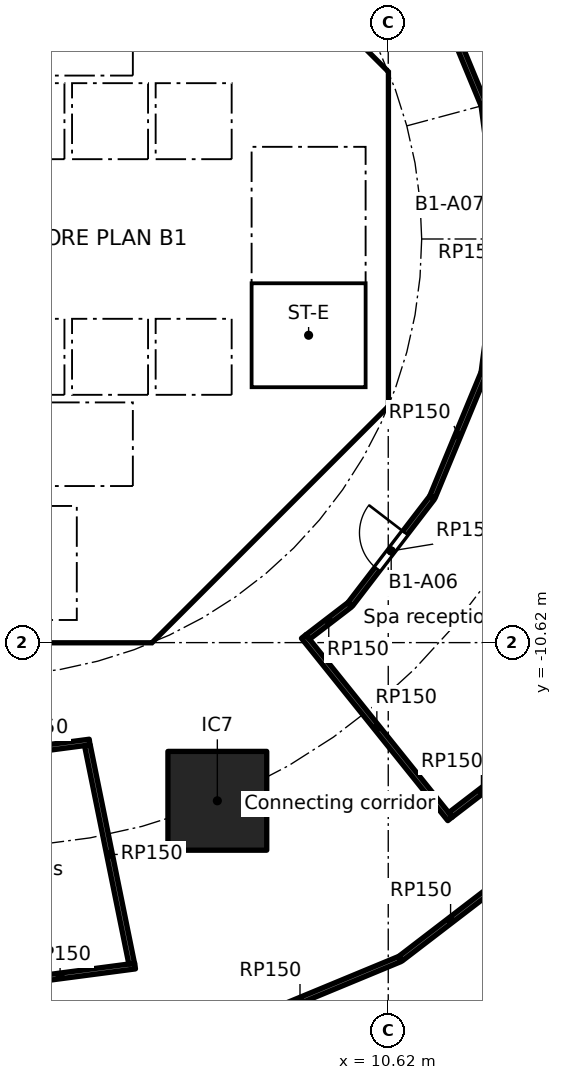
"""IFC4 building model, lengths in metres.
Left out: names, types, materials, properties, quantities, classifications, styles, units other than length and angle.
Written with IfcOpenShell. Run it as: python <this file> out.ifc"""

import sys

from ifc_helpers import new_model, si_unit, direction, frame, frame_2d, origin, origin_2d, place, context, subcontext, project, spatial, polyline, rectangle, outline, extrude, element, fill, save


model = new_model("IFC4")
c1 = context("Model", 3, precision=1e-05, world=origin(), true_north=direction((0.0, 1.0)))
c2 = subcontext(c1, "Body", "Model", "MODEL_VIEW")
j1 = project(units=[si_unit("LENGTHUNIT", "METRE"), si_unit("PLANEANGLEUNIT", "RADIAN")], contexts=[c1])
p1 = place(None, origin())
s1 = spatial("IfcSite", under=j1, at=p1, CompositionType="ELEMENT")
p2 = place(p1, origin())
s2 = spatial("IfcBuilding", under=s1, at=p2, CompositionType="ELEMENT")
p3 = place(p2, frame((0.0, 0.0, -5.0)))
s3 = spatial("IfcBuildingStorey", under=s2, at=p3, CompositionType="ELEMENT", Elevation=-5.0)
p4 = place(p3, frame((6.123, -14.782, 0.0), z_axis=(0.0, 0.0, 1.0), x_axis=(1.0, 0.0, 0.0)))
e1 = element("IfcColumn", 1, at=p4, inside=s3, PredefinedType="COLUMN", context=c2, shape_type="SweptSolid", body=[
    extrude(rectangle(XDim=2.6, YDim=2.6, at=origin_2d()), origin(), (0.0, 0.0, 1.0), 5.0),
])
p5 = place(p3, frame((9.988, 4.613, 0.0), z_axis=(0.0, 0.0, 1.0), x_axis=(-0.707106781187, 0.707106781187, 0.0)))
e2 = element("IfcWall", 2, at=p5, inside=s3, PredefinedType="SHEAR", context=c2, shape_type="SweptSolid", body=[
    extrude(rectangle(XDim=7.602, YDim=0.6, at=frame_2d((3.801, 0.0))), origin(), (0.0, 0.0, 1.0), 4.6),
])
p6 = place(p5, frame((3.201, 0.0, 0.0)))
e3 = element("IfcOpeningElement", 3, at=p6, cuts=e2, PredefinedType="OPENING", context=c2, shape_type="SweptSolid", body=[
    extrude(rectangle(XDim=1.2, YDim=2.1, at=frame_2d((0.6, 1.05))), frame((0.0, 0.31, 0.0), z_axis=(0.0, -1.0, 0.0), x_axis=(1.0, 0.0, 0.0)), (0.0, 0.0, 1.0), 0.62),
])
p7 = place(p3, frame((4.613, -9.988, 0.0), z_axis=(0.0, 0.0, 1.0), x_axis=(0.707106781187, 0.707106781187, 0.0)))
e4 = element("IfcWall", 4, at=p7, inside=s3, PredefinedType="SHEAR", context=c2, shape_type="SweptSolid", body=[
    extrude(rectangle(XDim=7.602, YDim=0.6, at=frame_2d((3.801, 0.0))), origin(), (0.0, 0.0, 1.0), 4.6),
])
p8 = place(p7, frame((3.201, 0.0, 0.0)))
e5 = element("IfcOpeningElement", 5, at=p8, cuts=e4, PredefinedType="OPENING", context=c2, shape_type="SweptSolid", body=[
    extrude(rectangle(XDim=1.2, YDim=2.1, at=frame_2d((0.6, 1.05))), frame((0.0, 0.31, 0.0), z_axis=(0.0, -1.0, 0.0), x_axis=(1.0, 0.0, 0.0)), (0.0, 0.0, 1.0), 0.62),
])
p9 = place(p3, frame((4.0, 4.3, 0.0), z_axis=(0.0, 0.0, 1.0), x_axis=(0.0, 1.0, 0.0)))
e6 = element("IfcWall", 6, at=p9, inside=s3, PredefinedType="SOLIDWALL", context=c2, shape_type="SweptSolid", body=[
    extrude(rectangle(XDim=2.2, YDim=0.2, at=frame_2d((1.1, 0.0))), origin(), (0.0, 0.0, 1.0), 4.6),
])
p10 = place(p9, frame((0.55, 0.0, 0.0)))
e7 = element("IfcOpeningElement", 7, at=p10, cuts=e6, PredefinedType="OPENING", context=c2, shape_type="SweptSolid", body=[
    extrude(rectangle(XDim=1.1, YDim=2.1, at=frame_2d((0.55, 1.05))), frame((0.0, 0.11, 0.0), z_axis=(0.0, -1.0, 0.0), x_axis=(1.0, 0.0, 0.0)), (0.0, 0.0, 1.0), 0.22),
])
p11 = place(p3, frame((-6.7, 2.0, 0.0), z_axis=(0.0, 0.0, 1.0), x_axis=(1.0, 0.0, 0.0)))
e8 = element("IfcWall", 8, at=p11, inside=s3, PredefinedType="SOLIDWALL", context=c2, shape_type="SweptSolid", body=[
    extrude(rectangle(XDim=13.4, YDim=0.2, at=frame_2d((6.7, 0.0))), origin(), (0.0, 0.0, 1.0), 4.6),
])
p12 = place(p11, frame((0.65, 0.0, 0.0)))
e9 = element("IfcOpeningElement", 9, at=p12, cuts=e8, PredefinedType="OPENING", context=c2, shape_type="SweptSolid", body=[
    extrude(rectangle(XDim=1.1, YDim=2.1, at=frame_2d((0.55, 1.05))), frame((0.0, 0.11, 0.0), z_axis=(0.0, -1.0, 0.0), x_axis=(1.0, 0.0, 0.0)), (0.0, 0.0, 1.0), 0.22),
])
p13 = place(p11, frame((2.85, 0.0, 0.0)))
e10 = element("IfcOpeningElement", 10, at=p13, cuts=e8, PredefinedType="OPENING", context=c2, shape_type="SweptSolid", body=[
    extrude(rectangle(XDim=1.1, YDim=2.1, at=frame_2d((0.55, 1.05))), frame((0.0, 0.11, 0.0), z_axis=(0.0, -1.0, 0.0), x_axis=(1.0, 0.0, 0.0)), (0.0, 0.0, 1.0), 0.22),
])
p14 = place(p11, frame((5.05, 0.0, 0.0)))
e11 = element("IfcOpeningElement", 11, at=p14, cuts=e8, PredefinedType="OPENING", context=c2, shape_type="SweptSolid", body=[
    extrude(rectangle(XDim=1.1, YDim=2.1, at=frame_2d((0.55, 1.05))), frame((0.0, 0.11, 0.0), z_axis=(0.0, -1.0, 0.0), x_axis=(1.0, 0.0, 0.0)), (0.0, 0.0, 1.0), 0.22),
])
p15 = place(p11, frame((7.25, 0.0, 0.0)))
e12 = element("IfcOpeningElement", 12, at=p15, cuts=e8, PredefinedType="OPENING", context=c2, shape_type="SweptSolid", body=[
    extrude(rectangle(XDim=1.1, YDim=2.1, at=frame_2d((0.55, 1.05))), frame((0.0, 0.11, 0.0), z_axis=(0.0, -1.0, 0.0), x_axis=(1.0, 0.0, 0.0)), (0.0, 0.0, 1.0), 0.22),
])
p16 = place(p11, frame((9.45, 0.0, 0.0)))
e13 = element("IfcOpeningElement", 13, at=p16, cuts=e8, PredefinedType="OPENING", context=c2, shape_type="SweptSolid", body=[
    extrude(rectangle(XDim=1.1, YDim=2.1, at=frame_2d((0.55, 1.05))), frame((0.0, 0.11, 0.0), z_axis=(0.0, -1.0, 0.0), x_axis=(1.0, 0.0, 0.0)), (0.0, 0.0, 1.0), 0.22),
])
p17 = place(p11, frame((11.65, 0.0, 0.0)))
e14 = element("IfcOpeningElement", 14, at=p17, cuts=e8, PredefinedType="OPENING", context=c2, shape_type="SweptSolid", body=[
    extrude(rectangle(XDim=1.1, YDim=2.1, at=frame_2d((0.55, 1.05))), frame((0.0, 0.11, 0.0), z_axis=(0.0, -1.0, 0.0), x_axis=(1.0, 0.0, 0.0)), (0.0, 0.0, 1.0), 0.22),
])
p18 = place(p3, frame((6.7, 4.0, 0.0), z_axis=(0.0, 0.0, 1.0), x_axis=(1.0, 0.0, 0.0)))
e15 = element("IfcWall", 15, at=p18, inside=s3, PredefinedType="SOLIDWALL", context=c2, shape_type="SweptSolid", body=[
    extrude(rectangle(XDim=3.325, YDim=0.2, at=frame_2d((1.662, 0.0))), origin(), (0.0, 0.0, 1.0), 4.6),
])
p19 = place(p18, frame((1.25, 0.0, 0.0)))
e16 = element("IfcOpeningElement", 16, at=p19, cuts=e15, PredefinedType="OPENING", context=c2, shape_type="SweptSolid", body=[
    extrude(rectangle(XDim=1.1, YDim=2.1, at=frame_2d((0.55, 1.05))), frame((0.0, 0.11, 0.0), z_axis=(0.0, -1.0, 0.0), x_axis=(1.0, 0.0, 0.0)), (0.0, 0.0, 1.0), 0.22),
])
p20 = place(p3, frame((4.0, -10.025, 0.0), z_axis=(0.0, 0.0, 1.0), x_axis=(0.0, 1.0, 0.0)))
e17 = element("IfcWall", 17, at=p20, inside=s3, PredefinedType="SOLIDWALL", context=c2, shape_type="SweptSolid", body=[
    extrude(rectangle(XDim=3.0, YDim=0.2, at=frame_2d((1.5, 0.0))), origin(), (0.0, 0.0, 1.0), 4.6),
])
p21 = place(p20, frame((0.975, 0.0, 0.0)))
e18 = element("IfcOpeningElement", 18, at=p21, cuts=e17, PredefinedType="OPENING", context=c2, shape_type="SweptSolid", body=[
    extrude(rectangle(XDim=1.1, YDim=2.1, at=frame_2d((0.55, 1.05))), frame((0.0, 0.11, 0.0), z_axis=(0.0, -1.0, 0.0), x_axis=(1.0, 0.0, 0.0)), (0.0, 0.0, 1.0), 0.22),
])
p22 = place(p3, frame((4.0, -6.5, 0.0), z_axis=(0.0, 0.0, 1.0), x_axis=(0.0, 1.0, 0.0)))
e19 = element("IfcWall", 19, at=p22, inside=s3, PredefinedType="SOLIDWALL", context=c2, shape_type="SweptSolid", body=[
    extrude(rectangle(XDim=2.2, YDim=0.2, at=frame_2d((1.1, 0.0))), origin(), (0.0, 0.0, 1.0), 4.6),
])
p23 = place(p22, frame((0.55, 0.0, 0.0)))
e20 = element("IfcOpeningElement", 20, at=p23, cuts=e19, PredefinedType="OPENING", context=c2, shape_type="SweptSolid", body=[
    extrude(rectangle(XDim=1.1, YDim=2.1, at=frame_2d((0.55, 1.05))), frame((0.0, 0.11, 0.0), z_axis=(0.0, -1.0, 0.0), x_axis=(1.0, 0.0, 0.0)), (0.0, 0.0, 1.0), 0.22),
])
p24 = place(p3, frame((-6.7, -2.0, 0.0), z_axis=(0.0, 0.0, 1.0), x_axis=(1.0, 0.0, 0.0)))
e21 = element("IfcWall", 21, at=p24, inside=s3, PredefinedType="SOLIDWALL", context=c2, shape_type="SweptSolid", body=[
    extrude(rectangle(XDim=13.4, YDim=0.2, at=frame_2d((6.7, 0.0))), origin(), (0.0, 0.0, 1.0), 4.6),
])
p25 = place(p24, frame((0.65, 0.0, 0.0)))
e22 = element("IfcOpeningElement", 22, at=p25, cuts=e21, PredefinedType="OPENING", context=c2, shape_type="SweptSolid", body=[
    extrude(rectangle(XDim=1.1, YDim=2.1, at=frame_2d((0.55, 1.05))), frame((0.0, 0.11, 0.0), z_axis=(0.0, -1.0, 0.0), x_axis=(1.0, 0.0, 0.0)), (0.0, 0.0, 1.0), 0.22),
])
p26 = place(p24, frame((2.85, 0.0, 0.0)))
e23 = element("IfcOpeningElement", 23, at=p26, cuts=e21, PredefinedType="OPENING", context=c2, shape_type="SweptSolid", body=[
    extrude(rectangle(XDim=1.1, YDim=2.1, at=frame_2d((0.55, 1.05))), frame((0.0, 0.11, 0.0), z_axis=(0.0, -1.0, 0.0), x_axis=(1.0, 0.0, 0.0)), (0.0, 0.0, 1.0), 0.22),
])
p27 = place(p24, frame((5.05, 0.0, 0.0)))
e24 = element("IfcOpeningElement", 24, at=p27, cuts=e21, PredefinedType="OPENING", context=c2, shape_type="SweptSolid", body=[
    extrude(rectangle(XDim=1.1, YDim=2.1, at=frame_2d((0.55, 1.05))), frame((0.0, 0.11, 0.0), z_axis=(0.0, -1.0, 0.0), x_axis=(1.0, 0.0, 0.0)), (0.0, 0.0, 1.0), 0.22),
])
p28 = place(p24, frame((7.25, 0.0, 0.0)))
e25 = element("IfcOpeningElement", 25, at=p28, cuts=e21, PredefinedType="OPENING", context=c2, shape_type="SweptSolid", body=[
    extrude(rectangle(XDim=1.1, YDim=2.1, at=frame_2d((0.55, 1.05))), frame((0.0, 0.11, 0.0), z_axis=(0.0, -1.0, 0.0), x_axis=(1.0, 0.0, 0.0)), (0.0, 0.0, 1.0), 0.22),
])
p29 = place(p24, frame((9.45, 0.0, 0.0)))
e26 = element("IfcOpeningElement", 26, at=p29, cuts=e21, PredefinedType="OPENING", context=c2, shape_type="SweptSolid", body=[
    extrude(rectangle(XDim=1.1, YDim=2.1, at=frame_2d((0.55, 1.05))), frame((0.0, 0.11, 0.0), z_axis=(0.0, -1.0, 0.0), x_axis=(1.0, 0.0, 0.0)), (0.0, 0.0, 1.0), 0.22),
])
p30 = place(p24, frame((11.65, 0.0, 0.0)))
e27 = element("IfcOpeningElement", 27, at=p30, cuts=e21, PredefinedType="OPENING", context=c2, shape_type="SweptSolid", body=[
    extrude(rectangle(XDim=1.1, YDim=2.1, at=frame_2d((0.55, 1.05))), frame((0.0, 0.11, 0.0), z_axis=(0.0, -1.0, 0.0), x_axis=(1.0, 0.0, 0.0)), (0.0, 0.0, 1.0), 0.22),
])
p31 = place(p3, origin())
e28 = element("IfcWall", 28, at=p31, inside=s3, PredefinedType="SHEAR", context=c2, shape_type="SweptSolid", body=[
    extrude(outline(polyline([(-4.152, -10.025), (4.152, -10.025), (4.401, -9.776), (4.825, -10.2), (4.401, -10.625), (-4.401, -10.625), (-4.825, -10.2), (-4.401, -9.776), (-4.152, -10.025)])), origin(), (0.0, 0.0, 1.0), 4.6),
])
p32 = place(p3, origin())
e29 = element("IfcWall", 29, at=p32, inside=s3, PredefinedType="SHEAR", context=c2, shape_type="SweptSolid", body=[
    extrude(outline(polyline([(9.776, -4.401), (10.025, -4.152), (10.025, -3.801), (10.025, 4.152), (9.776, 4.401), (10.2, 4.825), (10.625, 4.401), (10.625, -4.401), (10.2, -4.825), (9.776, -4.401)])), origin(), (0.0, 0.0, 1.0), 4.6),
])
p33 = place(p3, origin())
e30 = element("IfcWall", 30, at=p33, inside=s3, PredefinedType="SOLIDWALL", context=c2, shape_type="SweptSolid", body=[
    extrude(outline(polyline([(-6.7, -2.1), (-6.5, -2.1), (-6.5, -4.1), (-4.5, -4.1), (-4.5, -2.1), (-4.3, -2.1), (-4.3, -4.1), (-2.3, -4.1), (-2.3, -2.1), (-2.1, -2.1), (-2.1, -4.1), (-0.1, -4.1), (-0.1, -2.1), (0.1, -2.1), (0.1, -4.1), (2.1, -4.1), (2.1, -2.1), (2.3, -2.1), (2.3, -4.1), (4.3, -4.1), (4.3, -2.1), (4.5, -2.1), (4.5, -4.1), (6.5, -4.1), (6.5, -2.1), (6.7, -2.1), (6.7, -4.3), (-6.7, -4.3), (-6.7, -2.1)])), origin(), (0.0, 0.0, 1.0), 4.6),
])
p34 = place(p3, origin())
e31 = element("IfcWall", 31, at=p34, inside=s3, PredefinedType="SOLIDWALL", context=c2, shape_type="SweptSolid", body=[
    extrude(outline(polyline([(-6.5, 2.1), (-6.7, 2.1), (-6.7, 4.3), (6.7, 4.3), (6.7, 2.1), (6.5, 2.1), (6.5, 4.1), (4.5, 4.1), (4.5, 2.1), (4.3, 2.1), (4.3, 4.1), (2.3, 4.1), (2.3, 2.1), (2.1, 2.1), (2.1, 4.1), (0.1, 4.1), (0.1, 2.1), (-0.1, 2.1), (-0.1, 4.1), (-2.1, 4.1), (-2.1, 2.1), (-2.3, 2.1), (-2.3, 4.1), (-4.3, 4.1), (-4.3, 2.1), (-4.5, 2.1), (-4.5, 4.1), (-6.5, 4.1), (-6.5, 2.1)])), origin(), (0.0, 0.0, 1.0), 4.6),
])
p35 = place(p3, origin())
e32 = element("IfcWall", 32, at=p35, inside=s3, PredefinedType="SOLIDWALL", context=c2, shape_type="SweptSolid", body=[
    extrude(outline(polyline([(4.1, -7.025), (-4.1, -7.025), (-4.1, -6.5), (4.1, -6.5), (4.1, -7.025)])), origin(), (0.0, 0.0, 1.0), 4.6),
])
p36 = place(p3, origin())
e33 = element("IfcWall", 33, at=p36, inside=s3, PredefinedType="SOLIDWALL", context=c2, shape_type="SweptSolid", body=[
    extrude(outline(polyline([(7.025, -3.9), (6.7, -3.9), (6.7, 3.9), (7.025, 3.9), (7.025, -3.9)])), origin(), (0.0, 0.0, 1.0), 4.6),
])
p37 = place(p3, origin())
e34 = element("IfcWall", 34, at=p37, inside=s3, PredefinedType="SOLIDWALL", context=c2, shape_type="SweptSolid", body=[
    extrude(outline(polyline([(10.025, -4.1), (6.7, -4.1), (6.7, -3.9), (10.025, -3.9), (10.025, -4.1)])), origin(), (0.0, 0.0, 1.0), 4.6),
])
p38 = place(p3, frame((0.012, -19.65, 0.0), z_axis=(0.0, 0.0, 1.0), x_axis=(0.991447196759, 0.13050845198, 0.0)))
e35 = element("IfcWall", 35, at=p38, inside=s3, PredefinedType="PARTITIONING", context=c2, shape_type="SweptSolid", body=[
    extrude(rectangle(XDim=3.981, YDim=0.15, at=frame_2d((1.99, 0.0))), origin(), (0.0, 0.0, 1.0), 4.6),
])
p39 = place(p3, frame((2.762, -13.236, 0.0), z_axis=(0.0, 0.0, 1.0), x_axis=(-0.991448603925, -0.130497761571, 0.0)))
e36 = element("IfcWall", 36, at=p39, inside=s3, PredefinedType="PARTITIONING", context=c2, shape_type="SweptSolid", body=[
    extrude(rectangle(XDim=2.774, YDim=0.15, at=frame_2d((1.387, 0.0))), origin(), (0.0, 0.0, 1.0), 4.6),
])
p40 = place(p3, frame((3.869, -19.067, 0.0), z_axis=(0.0, 0.0, 1.0), x_axis=(-0.198877500107, 0.980024356815, 0.0)))
e37 = element("IfcWall", 37, at=p40, inside=s3, PredefinedType="PARTITIONING", context=c2, shape_type="SweptSolid", body=[
    extrude(rectangle(XDim=5.864, YDim=0.15, at=frame_2d((2.932, 0.0))), origin(), (0.0, 0.0, 1.0), 4.6),
])
p41 = place(p3, frame((8.395, -10.459, 0.0), z_axis=(0.0, 0.0, 1.0), x_axis=(0.62590911152, -0.779896008527, 0.0)))
e38 = element("IfcWall", 38, at=p41, inside=s3, PredefinedType="PARTITIONING", context=c2, shape_type="SweptSolid", body=[
    extrude(rectangle(XDim=6.152, YDim=0.15, at=frame_2d((3.076, 0.0))), origin(), (0.0, 0.0, 1.0), 4.6),
])
p42 = place(p3, frame((9.607, -9.624, 0.0), z_axis=(0.0, 0.0, 1.0), x_axis=(-0.793372285054, -0.608736738918, 0.0)))
e39 = element("IfcWall", 39, at=p42, inside=s3, PredefinedType="PARTITIONING", context=c2, shape_type="SweptSolid", body=[
    extrude(rectangle(XDim=1.394, YDim=0.15, at=frame_2d((0.697, 0.0))), origin(), (0.0, 0.0, 1.0), 4.6),
])
p43 = place(p3, frame((10.924, -18.945, 0.0), z_axis=(0.0, 0.0, 1.0), x_axis=(-0.923876568882, -0.38269058712, 0.0)))
e40 = element("IfcWall", 40, at=p43, inside=s3, PredefinedType="PARTITIONING", context=c2, shape_type="SweptSolid", body=[
    extrude(rectangle(XDim=5.686, YDim=0.15, at=frame_2d((2.843, 0.0))), origin(), (0.0, 0.0, 1.0), 4.6),
])
p44 = place(p3, frame((11.771, -6.809, 0.0), z_axis=(0.0, 0.0, 1.0), x_axis=(-0.608736710054, -0.793372307201, 0.0)))
e41 = element("IfcWall", 41, at=p44, inside=s3, PredefinedType="PARTITIONING", context=c2, shape_type="SweptSolid", body=[
    extrude(rectangle(XDim=3.527, YDim=0.15, at=frame_2d((1.763, 0.0))), origin(), (0.0, 0.0, 1.0), 4.6),
])
p45 = place(p44, frame((1.163, 0.0, 0.0)))
e42 = element("IfcOpeningElement", 42, at=p45, cuts=e41, PredefinedType="OPENING", context=c2, shape_type="SweptSolid", body=[
    extrude(rectangle(XDim=1.2, YDim=2.1, at=frame_2d((0.6, 1.05))), frame((0.0, 0.085, 0.0), z_axis=(0.0, -1.0, 0.0), x_axis=(1.0, 0.0, 0.0)), (0.0, 0.0, 1.0), 0.17),
])
p46 = place(p3, frame((11.782, 6.789, 0.0), z_axis=(0.0, 0.0, 1.0), x_axis=(0.382677866108, -0.923881838111, 0.0)))
e43 = element("IfcWall", 43, at=p46, inside=s3, PredefinedType="PARTITIONING", context=c2, shape_type="SweptSolid", body=[
    extrude(rectangle(XDim=3.527, YDim=0.15, at=frame_2d((1.763, 0.0))), origin(), (0.0, 0.0, 1.0), 4.6),
])
p47 = place(p3, frame((12.258, -15.153, 0.0), z_axis=(0.0, 0.0, 1.0), x_axis=(0.793344054907, 0.608773529766, 0.0)))
e44 = element("IfcWall", 44, at=p47, inside=s3, PredefinedType="PARTITIONING", context=c2, shape_type="SweptSolid", body=[
    extrude(rectangle(XDim=2.053, YDim=0.15, at=frame_2d((1.026, 0.0))), origin(), (0.0, 0.0, 1.0), 4.6),
])
p48 = place(p3, frame((13.132, -3.531, 0.0), z_axis=(0.0, 0.0, 1.0), x_axis=(-0.382677866108, -0.923881838111, 0.0)))
e45 = element("IfcWall", 45, at=p48, inside=s3, PredefinedType="PARTITIONING", context=c2, shape_type="SweptSolid", body=[
    extrude(rectangle(XDim=3.527, YDim=0.15, at=frame_2d((1.763, 0.0))), origin(), (0.0, 0.0, 1.0), 4.6),
])
for number, where, z_axis, x_axis in (
    (46, (13.138, 3.508, 0.0), (0.0, 0.0, 1.0), (0.131, -0.991, 0.0)),
    (47, (13.367, -1.771, 0.0), (0.0, 0.0, 1.0), (-0.131, -0.991, 0.0)),
):
    element("IfcWall", number, at=place(p3, frame(where, z_axis=z_axis, x_axis=x_axis)), inside=s3, PredefinedType="PARTITIONING", context=c2, shape_type="SweptSolid", body=[
        extrude(rectangle(XDim=1.752, YDim=0.15, at=frame_2d((0.876, 0.0))), origin(), (0.0, 0.0, 1.0), 4.6),
    ])
p49 = place(p3, frame((13.576, -16.915, 0.0), z_axis=(0.0, 0.0, 1.0), x_axis=(-0.793343228751, -0.608774606398, 0.0)))
e48 = element("IfcWall", 48, at=p49, inside=s3, PredefinedType="PARTITIONING", context=c2, shape_type="SweptSolid", body=[
    extrude(rectangle(XDim=3.316, YDim=0.15, at=frame_2d((1.658, 0.0))), origin(), (0.0, 0.0, 1.0), 4.6),
])
p50 = place(p16, origin())
e49 = element("IfcDoor", 49, at=p50, inside=s3, OperationType="DOUBLE_DOOR_SLIDING", PredefinedType="DOOR", context=c2, shape_type="SweptSolid", body=[
    extrude(rectangle(XDim=1.1, YDim=2.1, at=frame_2d((0.55, 1.05))), frame((0.0, 0.025, 0.0), z_axis=(0.0, -1.0, 0.0), x_axis=(1.0, 0.0, 0.0)), (0.0, 0.0, 1.0), 0.05),
])
fill(e13, e49)
p51 = place(p17, origin())
e50 = element("IfcDoor", 50, at=p51, inside=s3, OperationType="DOUBLE_DOOR_SLIDING", PredefinedType="DOOR", context=c2, shape_type="SweptSolid", body=[
    extrude(rectangle(XDim=1.1, YDim=2.1, at=frame_2d((0.55, 1.05))), frame((0.0, 0.025, 0.0), z_axis=(0.0, -1.0, 0.0), x_axis=(1.0, 0.0, 0.0)), (0.0, 0.0, 1.0), 0.05),
])
fill(e14, e50)
p52 = place(p29, origin())
e51 = element("IfcDoor", 51, at=p52, inside=s3, OperationType="DOUBLE_DOOR_SLIDING", PredefinedType="DOOR", context=c2, shape_type="SweptSolid", body=[
    extrude(rectangle(XDim=1.1, YDim=2.1, at=frame_2d((0.55, 1.05))), frame((0.0, 0.025, 0.0), z_axis=(0.0, -1.0, 0.0), x_axis=(1.0, 0.0, 0.0)), (0.0, 0.0, 1.0), 0.05),
])
fill(e26, e51)
p53 = place(p30, origin())
e52 = element("IfcDoor", 52, at=p53, inside=s3, OperationType="DOUBLE_DOOR_SLIDING", PredefinedType="DOOR", context=c2, shape_type="SweptSolid", body=[
    extrude(rectangle(XDim=1.1, YDim=2.1, at=frame_2d((0.55, 1.05))), frame((0.0, 0.025, 0.0), z_axis=(0.0, -1.0, 0.0), x_axis=(1.0, 0.0, 0.0)), (0.0, 0.0, 1.0), 0.05),
])
fill(e27, e52)
p54 = place(p10, origin())
e53 = element("IfcDoor", 53, at=p54, inside=s3, OperationType="DOUBLE_DOOR_SLIDING", PredefinedType="DOOR", context=c2, shape_type="SweptSolid", body=[
    extrude(rectangle(XDim=1.1, YDim=2.1, at=frame_2d((0.55, 1.05))), frame((0.0, 0.025, 0.0), z_axis=(0.0, -1.0, 0.0), x_axis=(1.0, 0.0, 0.0)), (0.0, 0.0, 1.0), 0.05),
])
fill(e7, e53)
p55 = place(p23, origin())
e54 = element("IfcDoor", 54, at=p55, inside=s3, OperationType="DOUBLE_DOOR_SLIDING", PredefinedType="DOOR", context=c2, shape_type="SweptSolid", body=[
    extrude(rectangle(XDim=1.1, YDim=2.1, at=frame_2d((0.55, 1.05))), frame((0.0, 0.025, 0.0), z_axis=(0.0, -1.0, 0.0), x_axis=(1.0, 0.0, 0.0)), (0.0, 0.0, 1.0), 0.05),
])
fill(e20, e54)
p56 = place(p19, frame((1.1, 0.0, 0.0), x_axis=(-1.0, 0.0, 0.0)))
e55 = element("IfcDoor", 55, at=p56, inside=s3, OperationType="SINGLE_SWING_RIGHT", PredefinedType="DOOR", context=c2, shape_type="SweptSolid", body=[
    extrude(rectangle(XDim=1.1, YDim=2.1, at=frame_2d((0.55, 1.05))), frame((0.0, 0.025, 0.0), z_axis=(0.0, -1.0, 0.0), x_axis=(1.0, 0.0, 0.0)), (0.0, 0.0, 1.0), 0.05),
])
fill(e16, e55)
p57 = place(p21, origin())
e56 = element("IfcDoor", 56, at=p57, inside=s3, OperationType="SINGLE_SWING_RIGHT", PredefinedType="DOOR", context=c2, shape_type="SweptSolid", body=[
    extrude(rectangle(XDim=1.1, YDim=2.1, at=frame_2d((0.55, 1.05))), frame((0.0, 0.025, 0.0), z_axis=(0.0, -1.0, 0.0), x_axis=(1.0, 0.0, 0.0)), (0.0, 0.0, 1.0), 0.05),
])
fill(e18, e56)
p58 = place(p8, origin())
e57 = element("IfcDoor", 57, at=p58, inside=s3, OperationType="SINGLE_SWING_RIGHT", PredefinedType="DOOR", context=c2, shape_type="SweptSolid", body=[
    extrude(rectangle(XDim=1.2, YDim=2.1, at=frame_2d((0.6, 1.05))), frame((0.0, 0.025, 0.0), z_axis=(0.0, -1.0, 0.0), x_axis=(1.0, 0.0, 0.0)), (0.0, 0.0, 1.0), 0.05),
])
fill(e5, e57)
p59 = place(p45, frame((1.2, 0.0, 0.0), x_axis=(-1.0, 0.0, 0.0)))
e58 = element("IfcDoor", 58, at=p59, inside=s3, OperationType="SINGLE_SWING_RIGHT", PredefinedType="DOOR", context=c2, shape_type="SweptSolid", body=[
    extrude(rectangle(XDim=1.2, YDim=2.1, at=frame_2d((0.6, 1.05))), frame((0.0, 0.025, 0.0), z_axis=(0.0, -1.0, 0.0), x_axis=(1.0, 0.0, 0.0)), (0.0, 0.0, 1.0), 0.05),
])
fill(e42, e58)
save(model, sys.argv[1])
